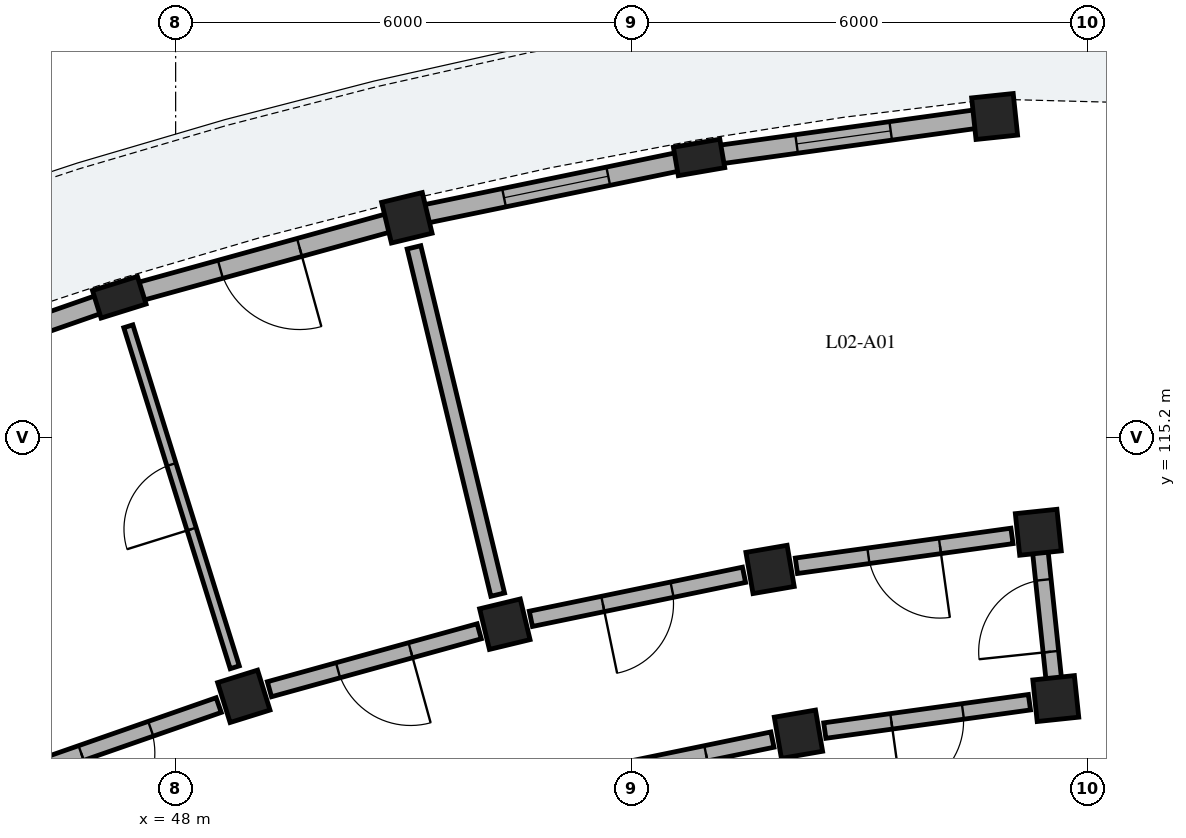
"""IFC4 building model, lengths in metres.
Left out: names, types, materials, properties, quantities, classifications, styles, units other than length and angle.
Written with IfcOpenShell. Run it as: python <this file> out.ifc"""

import sys

from ifc_helpers import new_model, si_unit, direction, frame, frame_2d, origin, origin_2d, place, context, subcontext, project, spatial, rectangle, extrude, element, fill, save


model = new_model("IFC4")
c1 = context("Model", 3, precision=1e-05, world=origin(), true_north=direction((0.0, 1.0)))
c2 = subcontext(c1, "Body", "Model", "MODEL_VIEW")
j1 = project(units=[si_unit("LENGTHUNIT", "METRE"), si_unit("PLANEANGLEUNIT", "RADIAN")], contexts=[c1])
p1 = place(None, origin())
s1 = spatial("IfcSite", under=j1, at=p1, CompositionType="ELEMENT")
p2 = place(p1, origin())
s2 = spatial("IfcBuilding", under=s1, at=p2, CompositionType="ELEMENT")
p3 = place(p2, frame((0.0, 0.0, 8.84)))
s3 = spatial("IfcBuildingStorey", under=s2, at=p3, CompositionType="ELEMENT", Elevation=8.84)
for number, where, z_axis, x_axis in (
    (1, (59.58, 111.766, 0.0), (0.0, 0.0, 1.0), (-0.105, 0.995, 0.0)),
    (2, (59.35, 113.954, 0.0), (0.0, 0.0, 1.0), (-0.105, 0.995, 0.0)),
    (3, (58.775, 119.424, 0.0), (0.0, 0.0, 1.0), (-0.105, 0.995, 0.0)),
    (4, (56.194, 111.297, 0.0), (0.0, 0.0, 1.0), (-0.17, 0.985, 0.0)),
    (5, (55.821, 113.465, 0.0), (0.0, 0.0, 1.0), (-0.17, 0.985, 0.0)),
):
    element("IfcColumn", number, at=place(p3, frame(where, z_axis=z_axis, x_axis=x_axis)), inside=s3, PredefinedType="COLUMN", context=c2, shape_type="SweptSolid", body=[
        extrude(rectangle(XDim=0.55, YDim=0.55, at=origin_2d()), origin(), (0.0, 0.0, 1.0), 3.105),
    ])
p4 = place(p3, frame((54.887, 118.885, 0.0), z_axis=(0.0, 0.0, 1.0), x_axis=(-0.169827298811, 0.985473839622, 0.0)))
e6 = element("IfcColumn", 6, at=p4, inside=s3, PredefinedType="PILASTER", context=c2, shape_type="SweptSolid", body=[
    extrude(rectangle(XDim=0.38, YDim=0.62, at=origin_2d()), origin(), (0.0, 0.0, 1.0), 3.105),
])
for number, where, z_axis, x_axis in (
    (7, (52.331, 112.744, 0.0), (0.0, 0.0, 1.0), (-0.234, 0.972, 0.0)),
    (8, (51.042, 118.091, 0.0), (0.0, 0.0, 1.0), (-0.234, 0.972, 0.0)),
    (9, (48.897, 111.795, 0.0), (0.0, 0.0, 1.0), (-0.298, 0.955, 0.0)),
):
    element("IfcColumn", number, at=place(p3, frame(where, z_axis=z_axis, x_axis=x_axis)), inside=s3, PredefinedType="COLUMN", context=c2, shape_type="SweptSolid", body=[
        extrude(rectangle(XDim=0.55, YDim=0.55, at=origin_2d()), origin(), (0.0, 0.0, 1.0), 3.105),
    ])
p5 = place(p3, frame((47.258, 117.046, 0.0), z_axis=(0.0, 0.0, 1.0), x_axis=(-0.297930292146, 0.954587628781, 0.0)))
e10 = element("IfcColumn", 10, at=p5, inside=s3, PredefinedType="PILASTER", context=c2, shape_type="SweptSolid", body=[
    extrude(rectangle(XDim=0.38, YDim=0.62, at=origin_2d()), origin(), (0.0, 0.0, 1.0), 3.105),
])
p6 = place(p3, frame((58.533, 119.39, 0.0), z_axis=(0.0, 0.0, 1.0), x_axis=(-0.990539718913, -0.137226328578, 0.0)))
e11 = element("IfcWall", 11, at=p6, inside=s3, PredefinedType="SOLIDWALL", context=c2, shape_type="SweptSolid", body=[
    extrude(rectangle(XDim=3.521, YDim=0.245, at=frame_2d((1.76, 0.0))), origin(), (0.0, 0.0, 1.0), 2.355),
])
p7 = place(p6, frame((1.135, 0.0, 0.55)))
e12 = element("IfcOpeningElement", 12, at=p7, cuts=e11, PredefinedType="OPENING", context=c2, shape_type="SweptSolid", body=[
    extrude(rectangle(XDim=1.25, YDim=1.6, at=frame_2d((0.625, 0.8))), frame((0.0, 0.133, 0.0), z_axis=(0.0, -1.0, 0.0), x_axis=(1.0, 0.0, 0.0)), (0.0, 0.0, 1.0), 0.265),
])
p8 = place(p3, frame((54.73, 118.853, 0.0), z_axis=(0.0, 0.0, 1.0), x_axis=(-0.979340051053, -0.202220336275, 0.0)))
e13 = element("IfcWall", 13, at=p8, inside=s3, PredefinedType="SOLIDWALL", context=c2, shape_type="SweptSolid", body=[
    extrude(rectangle(XDim=3.521, YDim=0.245, at=frame_2d((1.76, 0.0))), origin(), (0.0, 0.0, 1.0), 2.355),
])
p9 = place(p8, frame((1.06, 0.0, 0.35)))
e14 = element("IfcOpeningElement", 14, at=p9, cuts=e13, PredefinedType="OPENING", context=c2, shape_type="SweptSolid", body=[
    extrude(rectangle(XDim=1.4, YDim=1.65, at=frame_2d((0.7, 0.825))), frame((0.0, 0.133, 0.0), z_axis=(0.0, -1.0, 0.0), x_axis=(1.0, 0.0, 0.0)), (0.0, 0.0, 1.0), 0.265),
])
p10 = place(p3, frame((50.806, 118.026, 0.0), z_axis=(0.0, 0.0, 1.0), x_axis=(-0.963899390209, -0.266266718826, 0.0)))
e15 = element("IfcWall", 15, at=p10, inside=s3, PredefinedType="SOLIDWALL", context=c2, shape_type="SweptSolid", body=[
    extrude(rectangle(XDim=3.521, YDim=0.245, at=frame_2d((1.76, 0.0))), origin(), (0.0, 0.0, 1.0), 2.355),
])
p11 = place(p10, frame((1.22, 0.0, 0.0)))
e16 = element("IfcOpeningElement", 16, at=p11, cuts=e15, PredefinedType="OPENING", context=c2, shape_type="SweptSolid", body=[
    extrude(rectangle(XDim=1.08, YDim=2.15, at=frame_2d((0.54, 1.075))), frame((0.0, 0.133, 0.0), z_axis=(0.0, -1.0, 0.0), x_axis=(1.0, 0.0, 0.0)), (0.0, 0.0, 1.0), 0.265),
])
p12 = place(p3, frame((47.107, 116.993, 0.0), z_axis=(0.0, 0.0, 1.0), x_axis=(-0.944267366677, -0.329179495455, 0.0)))
e17 = element("IfcWall", 17, at=p12, inside=s3, PredefinedType="SOLIDWALL", context=c2, shape_type="SweptSolid", body=[
    extrude(rectangle(XDim=3.521, YDim=0.245, at=frame_2d((1.76, 0.0))), origin(), (0.0, 0.0, 1.0), 2.355),
])
p13 = place(p12, frame((0.91, 0.0, 0.35)))
e18 = element("IfcOpeningElement", 18, at=p13, cuts=e17, PredefinedType="OPENING", context=c2, shape_type="SweptSolid", body=[
    extrude(rectangle(XDim=1.7, YDim=1.8, at=frame_2d((0.85, 0.9))), frame((0.0, 0.133, 0.0), z_axis=(0.0, -1.0, 0.0), x_axis=(1.0, 0.0, 0.0)), (0.0, 0.0, 1.0), 0.265),
])
p14 = place(p3, frame((59.004, 113.906, 0.0), z_axis=(0.0, 0.0, 1.0), x_axis=(-0.990544162976, -0.137194246211, 0.0)))
e19 = element("IfcWall", 19, at=p14, inside=s3, PredefinedType="PARTITIONING", context=c2, shape_type="SweptSolid", body=[
    extrude(rectangle(XDim=2.863, YDim=0.205, at=frame_2d((1.432, 0.0))), origin(), (0.0, 0.0, 1.0), 2.37),
])
p15 = place(p14, frame((0.957, 0.0, 0.0)))
e20 = element("IfcOpeningElement", 20, at=p15, cuts=e19, PredefinedType="OPENING", context=c2, shape_type="SweptSolid", body=[
    extrude(rectangle(XDim=0.95, YDim=2.13, at=frame_2d((0.475, 1.065))), frame((0.0, 0.113, 0.0), z_axis=(0.0, -1.0, 0.0), x_axis=(1.0, 0.0, 0.0)), (0.0, 0.0, 1.0), 0.225),
])
p16 = place(p3, frame((59.233, 111.718, 0.0), z_axis=(0.0, 0.0, 1.0), x_axis=(-0.990535404475, -0.137257467855, 0.0)))
e21 = element("IfcWall", 21, at=p16, inside=s3, PredefinedType="PARTITIONING", context=c2, shape_type="SweptSolid", body=[
    extrude(rectangle(XDim=2.718, YDim=0.205, at=frame_2d((1.359, 0.0))), origin(), (0.0, 0.0, 1.0), 2.37),
])
p17 = place(p16, frame((0.884, 0.0, 0.0)))
e22 = element("IfcOpeningElement", 22, at=p17, cuts=e21, PredefinedType="OPENING", context=c2, shape_type="SweptSolid", body=[
    extrude(rectangle(XDim=0.95, YDim=2.13, at=frame_2d((0.475, 1.065))), frame((0.0, 0.113, 0.0), z_axis=(0.0, -1.0, 0.0), x_axis=(1.0, 0.0, 0.0)), (0.0, 0.0, 1.0), 0.225),
])
p18 = place(p3, frame((55.478, 113.394, 0.0), z_axis=(0.0, 0.0, 1.0), x_axis=(-0.979348418612, -0.202179808492, 0.0)))
e23 = element("IfcWall", 23, at=p18, inside=s3, PredefinedType="PARTITIONING", context=c2, shape_type="SweptSolid", body=[
    extrude(rectangle(XDim=2.863, YDim=0.205, at=frame_2d((1.432, 0.0))), origin(), (0.0, 0.0, 1.0), 2.37),
])
p19 = place(p18, frame((0.967, 0.0, 0.0)))
e24 = element("IfcOpeningElement", 24, at=p19, cuts=e23, PredefinedType="OPENING", context=c2, shape_type="SweptSolid", body=[
    extrude(rectangle(XDim=0.93, YDim=2.12, at=frame_2d((0.465, 1.06))), frame((0.0, 0.113, 0.0), z_axis=(0.0, -1.0, 0.0), x_axis=(1.0, 0.0, 0.0)), (0.0, 0.0, 1.0), 0.225),
])
p20 = place(p3, frame((55.852, 111.226, 0.0), z_axis=(0.0, 0.0, 1.0), x_axis=(-0.979349423541, -0.202174940608, 0.0)))
e25 = element("IfcWall", 25, at=p20, inside=s3, PredefinedType="PARTITIONING", context=c2, shape_type="SweptSolid", body=[
    extrude(rectangle(XDim=2.718, YDim=0.205, at=frame_2d((1.359, 0.0))), origin(), (0.0, 0.0, 1.0), 2.37),
])
p21 = place(p20, frame((0.894, 0.0, 0.0)))
e26 = element("IfcOpeningElement", 26, at=p21, cuts=e25, PredefinedType="OPENING", context=c2, shape_type="SweptSolid", body=[
    extrude(rectangle(XDim=0.93, YDim=2.12, at=frame_2d((0.465, 1.06))), frame((0.0, 0.113, 0.0), z_axis=(0.0, -1.0, 0.0), x_axis=(1.0, 0.0, 0.0)), (0.0, 0.0, 1.0), 0.225),
])
p22 = place(p3, frame((52.238, 113.133, 0.0), z_axis=(0.0, 0.0, 1.0), x_axis=(-0.234386624934, 0.972143461662, 0.0)))
e27 = element("IfcWall", 27, at=p22, inside=s3, PredefinedType="PARTITIONING", context=c2, shape_type="SweptSolid", body=[
    extrude(rectangle(XDim=4.7, YDim=0.185, at=frame_2d((2.35, 0.0))), origin(), (0.0, 0.0, 1.0), 2.37),
])
p23 = place(p3, frame((51.994, 112.651, 0.0), z_axis=(0.0, 0.0, 1.0), x_axis=(-0.963890789093, -0.266297853356, 0.0)))
e28 = element("IfcWall", 28, at=p23, inside=s3, PredefinedType="PARTITIONING", context=c2, shape_type="SweptSolid", body=[
    extrude(rectangle(XDim=2.863, YDim=0.205, at=frame_2d((1.432, 0.0))), origin(), (0.0, 0.0, 1.0), 2.37),
])
p24 = place(p23, frame((0.937, 0.0, 0.0)))
e29 = element("IfcOpeningElement", 29, at=p24, cuts=e28, PredefinedType="OPENING", context=c2, shape_type="SweptSolid", body=[
    extrude(rectangle(XDim=0.99, YDim=2.16, at=frame_2d((0.495, 1.08))), frame((0.0, 0.113, 0.0), z_axis=(0.0, -1.0, 0.0), x_axis=(1.0, 0.0, 0.0)), (0.0, 0.0, 1.0), 0.225),
])
p25 = place(p3, frame((48.778, 112.177, 0.0), z_axis=(0.0, 0.0, 1.0), x_axis=(-0.297905254614, 0.954595442726, 0.0)))
e30 = element("IfcWall", 30, at=p25, inside=s3, PredefinedType="PARTITIONING", context=c2, shape_type="SweptSolid", body=[
    extrude(rectangle(XDim=4.7, YDim=0.125, at=frame_2d((2.35, 0.0))), origin(), (0.0, 0.0, 1.0), 2.37),
])
p26 = place(p25, frame((1.905, 0.0, 0.0)))
e31 = element("IfcOpeningElement", 31, at=p26, cuts=e30, PredefinedType="OPENING", context=c2, shape_type="SweptSolid", body=[
    extrude(rectangle(XDim=0.89, YDim=2.1, at=frame_2d((0.445, 1.05))), frame((0.0, 0.073, 0.0), z_axis=(0.0, -1.0, 0.0), x_axis=(1.0, 0.0, 0.0)), (0.0, 0.0, 1.0), 0.145),
])
p27 = place(p3, frame((48.566, 111.68, 0.0), z_axis=(0.0, 0.0, 1.0), x_axis=(-0.944253820929, -0.329218349522, 0.0)))
e32 = element("IfcWall", 32, at=p27, inside=s3, PredefinedType="PARTITIONING", context=c2, shape_type="SweptSolid", body=[
    extrude(rectangle(XDim=2.863, YDim=0.205, at=frame_2d((1.432, 0.0))), origin(), (0.0, 0.0, 1.0), 2.37),
])
p28 = place(p27, frame((0.947, 0.0, 0.0)))
e33 = element("IfcOpeningElement", 33, at=p28, cuts=e32, PredefinedType="OPENING", context=c2, shape_type="SweptSolid", body=[
    extrude(rectangle(XDim=0.97, YDim=2.15, at=frame_2d((0.485, 1.075))), frame((0.0, 0.113, 0.0), z_axis=(0.0, -1.0, 0.0), x_axis=(1.0, 0.0, 0.0)), (0.0, 0.0, 1.0), 0.225),
])
p29 = place(p3, frame((59.575, 111.816, 0.0), z_axis=(0.0, 0.0, 1.0), x_axis=(-0.104509292252, 0.994523910136, 0.0)))
e34 = element("IfcWall", 34, at=p29, inside=s3, PredefinedType="PARTITIONING", context=c2, shape_type="SweptSolid", body=[
    extrude(rectangle(XDim=2.1, YDim=0.205, at=frame_2d((1.05, 0.0))), origin(), (0.0, 0.0, 1.0), 2.37),
])
p30 = place(p29, frame((0.57, 0.0, 0.0)))
e35 = element("IfcOpeningElement", 35, at=p30, cuts=e34, PredefinedType="OPENING", context=c2, shape_type="SweptSolid", body=[
    extrude(rectangle(XDim=0.95, YDim=2.13, at=frame_2d((0.475, 1.065))), frame((0.0, 0.113, 0.0), z_axis=(0.0, -1.0, 0.0), x_axis=(1.0, 0.0, 0.0)), (0.0, 0.0, 1.0), 0.225),
])
p31 = place(p7, origin())
e36 = element("IfcWindow", 36, at=p31, inside=s3, PartitioningType="SINGLE_PANEL", PredefinedType="WINDOW", context=c2, shape_type="SweptSolid", body=[
    extrude(rectangle(XDim=1.25, YDim=1.6, at=frame_2d((0.625, 0.8))), frame((0.0, 0.03, 0.0), z_axis=(0.0, -1.0, 0.0), x_axis=(1.0, 0.0, 0.0)), (0.0, 0.0, 1.0), 0.06),
])
fill(e12, e36)
p32 = place(p9, origin())
e37 = element("IfcWindow", 37, at=p32, inside=s3, PartitioningType="SINGLE_PANEL", PredefinedType="WINDOW", context=c2, shape_type="SweptSolid", body=[
    extrude(rectangle(XDim=1.4, YDim=1.65, at=frame_2d((0.7, 0.825))), frame((0.0, 0.03, 0.0), z_axis=(0.0, -1.0, 0.0), x_axis=(1.0, 0.0, 0.0)), (0.0, 0.0, 1.0), 0.06),
])
fill(e14, e37)
p33 = place(p11, origin())
e38 = element("IfcDoor", 38, at=p33, inside=s3, OperationType="SINGLE_SWING_LEFT", PredefinedType="DOOR", context=c2, shape_type="SweptSolid", body=[
    extrude(rectangle(XDim=1.08, YDim=2.15, at=frame_2d((0.54, 1.075))), frame((0.0, 0.025, 0.0), z_axis=(0.0, -1.0, 0.0), x_axis=(1.0, 0.0, 0.0)), (0.0, 0.0, 1.0), 0.05),
])
fill(e16, e38)
p34 = place(p15, origin())
e39 = element("IfcDoor", 39, at=p34, inside=s3, OperationType="SINGLE_SWING_LEFT", PredefinedType="DOOR", context=c2, shape_type="SweptSolid", body=[
    extrude(rectangle(XDim=0.95, YDim=2.13, at=frame_2d((0.475, 1.065))), frame((0.0, 0.025, 0.0), z_axis=(0.0, -1.0, 0.0), x_axis=(1.0, 0.0, 0.0)), (0.0, 0.0, 1.0), 0.05),
])
fill(e20, e39)
p35 = place(p17, origin())
e40 = element("IfcDoor", 40, at=p35, inside=s3, OperationType="SINGLE_SWING_RIGHT", PredefinedType="DOOR", context=c2, shape_type="SweptSolid", body=[
    extrude(rectangle(XDim=0.95, YDim=2.13, at=frame_2d((0.475, 1.065))), frame((0.0, 0.025, 0.0), z_axis=(0.0, -1.0, 0.0), x_axis=(1.0, 0.0, 0.0)), (0.0, 0.0, 1.0), 0.05),
])
fill(e22, e40)
p36 = place(p19, origin())
e41 = element("IfcDoor", 41, at=p36, inside=s3, OperationType="SINGLE_SWING_RIGHT", PredefinedType="DOOR", context=c2, shape_type="SweptSolid", body=[
    extrude(rectangle(XDim=0.93, YDim=2.12, at=frame_2d((0.465, 1.06))), frame((0.0, 0.025, 0.0), z_axis=(0.0, -1.0, 0.0), x_axis=(1.0, 0.0, 0.0)), (0.0, 0.0, 1.0), 0.05),
])
fill(e24, e41)
p37 = place(p21, origin())
e42 = element("IfcDoor", 42, at=p37, inside=s3, OperationType="SINGLE_SWING_LEFT", PredefinedType="DOOR", context=c2, shape_type="SweptSolid", body=[
    extrude(rectangle(XDim=0.93, YDim=2.12, at=frame_2d((0.465, 1.06))), frame((0.0, 0.025, 0.0), z_axis=(0.0, -1.0, 0.0), x_axis=(1.0, 0.0, 0.0)), (0.0, 0.0, 1.0), 0.05),
])
fill(e26, e42)
p38 = place(p24, origin())
e43 = element("IfcDoor", 43, at=p38, inside=s3, OperationType="SINGLE_SWING_LEFT", PredefinedType="DOOR", context=c2, shape_type="SweptSolid", body=[
    extrude(rectangle(XDim=0.99, YDim=2.16, at=frame_2d((0.495, 1.08))), frame((0.0, 0.025, 0.0), z_axis=(0.0, -1.0, 0.0), x_axis=(1.0, 0.0, 0.0)), (0.0, 0.0, 1.0), 0.05),
])
fill(e29, e43)
p39 = place(p26, origin())
e44 = element("IfcDoor", 44, at=p39, inside=s3, OperationType="SINGLE_SWING_LEFT", PredefinedType="DOOR", context=c2, shape_type="SweptSolid", body=[
    extrude(rectangle(XDim=0.89, YDim=2.1, at=frame_2d((0.445, 1.05))), frame((0.0, 0.025, 0.0), z_axis=(0.0, -1.0, 0.0), x_axis=(1.0, 0.0, 0.0)), (0.0, 0.0, 1.0), 0.05),
])
fill(e31, e44)
p40 = place(p28, origin())
e45 = element("IfcDoor", 45, at=p40, inside=s3, OperationType="SINGLE_SWING_RIGHT", PredefinedType="DOOR", context=c2, shape_type="SweptSolid", body=[
    extrude(rectangle(XDim=0.97, YDim=2.15, at=frame_2d((0.485, 1.075))), frame((0.0, 0.025, 0.0), z_axis=(0.0, -1.0, 0.0), x_axis=(1.0, 0.0, 0.0)), (0.0, 0.0, 1.0), 0.05),
])
fill(e33, e45)
p41 = place(p30, origin())
e46 = element("IfcDoor", 46, at=p41, inside=s3, OperationType="SINGLE_SWING_LEFT", PredefinedType="DOOR", context=c2, shape_type="SweptSolid", body=[
    extrude(rectangle(XDim=0.95, YDim=2.13, at=frame_2d((0.475, 1.065))), frame((0.0, 0.025, 0.0), z_axis=(0.0, -1.0, 0.0), x_axis=(1.0, 0.0, 0.0)), (0.0, 0.0, 1.0), 0.05),
])
fill(e35, e46)
save(model, sys.argv[1])
